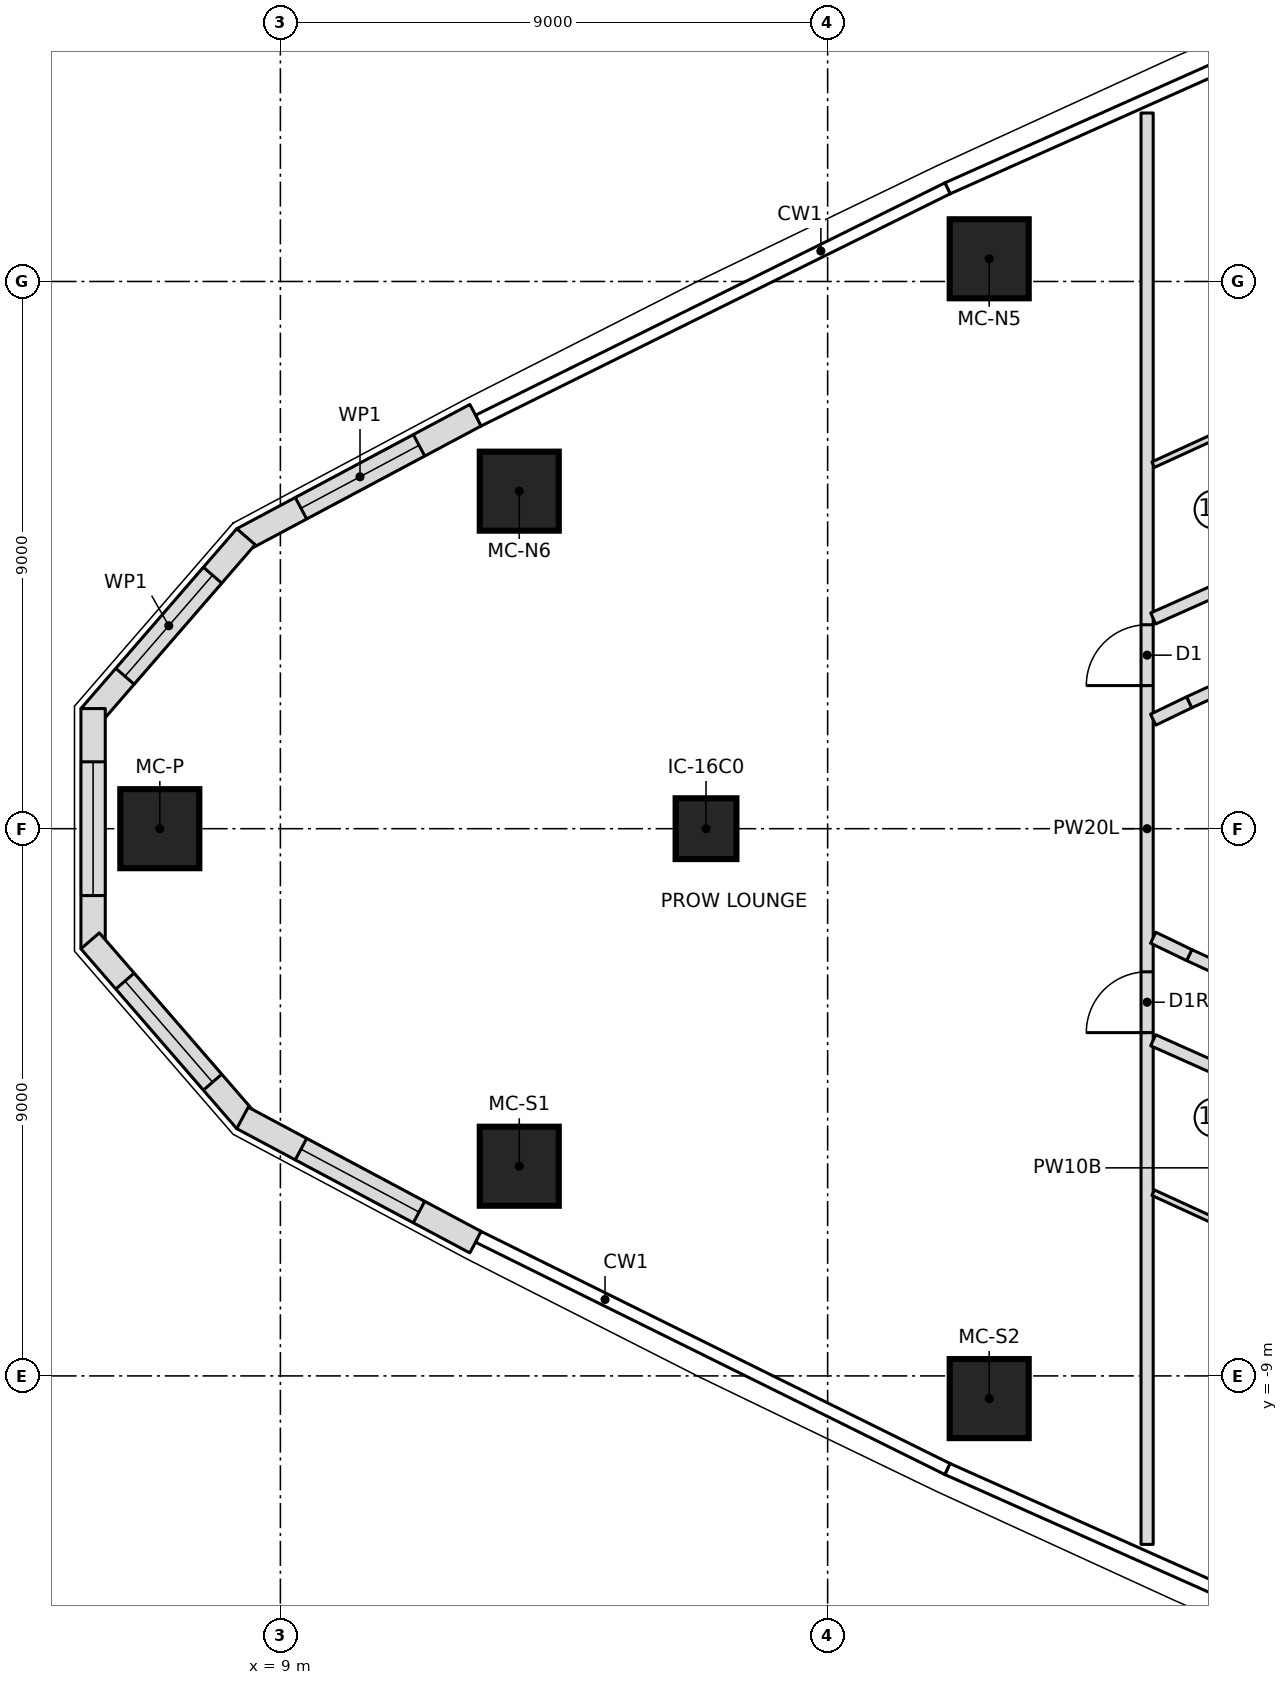
"""IFC4 building model, lengths in metres.
Left out: names, types, materials, properties, quantities, classifications, styles, units other than length and angle.
Written with IfcOpenShell. Run it as: python <this file> out.ifc"""

import sys

from ifc_helpers import new_model, si_unit, direction, frame, frame_2d, origin, origin_2d, place, context, subcontext, project, spatial, polyline, rectangle, outline, extrude, element, fill, save


model = new_model("IFC4")
c1 = context("Model", 3, precision=1e-05, world=origin(), true_north=direction((0.0, 1.0)))
c2 = subcontext(c1, "Body", "Model", "MODEL_VIEW")
j1 = project(units=[si_unit("LENGTHUNIT", "METRE"), si_unit("PLANEANGLEUNIT", "RADIAN")], contexts=[c1])
p1 = place(None, origin())
s1 = spatial("IfcSite", under=j1, at=p1, CompositionType="ELEMENT")
p2 = place(p1, origin())
s2 = spatial("IfcBuilding", under=s1, at=p2, CompositionType="ELEMENT")
p3 = place(p2, frame((0.0, 0.0, 203.9)))
s3 = spatial("IfcBuildingStorey", under=s2, at=p3, CompositionType="ELEMENT", Elevation=203.9)
for number, where, z_axis, x_axis in (
    (1, (7.017, 0.0, 0.0), (0.0, 0.0, 1.0), (1.0, 0.0, 0.0)),
    (2, (12.929, -5.552, 0.0), (0.0, 0.0, 1.0), (1.0, 0.0, 0.0)),
    (3, (20.657, -9.373, 0.0), (0.0, 0.0, 1.0), (1.0, 0.0, 0.0)),
    (4, (20.657, 9.373, 0.0), (0.0, 0.0, 1.0), (1.0, 0.0, 0.0)),
    (5, (12.929, 5.552, 0.0), (0.0, 0.0, 1.0), (1.0, 0.0, 0.0)),
):
    element("IfcColumn", number, at=place(p3, frame(where, z_axis=z_axis, x_axis=x_axis)), inside=s3, PredefinedType="COLUMN", context=c2, shape_type="SweptSolid", body=[
        extrude(rectangle(XDim=1.3, YDim=1.3, at=origin_2d()), origin(), (0.0, 0.0, 1.0), 3.55),
    ])
p4 = place(p3, frame((16.0, 0.0, 0.0), z_axis=(0.0, 0.0, 1.0), x_axis=(1.0, 0.0, 0.0)))
e6 = element("IfcColumn", 6, at=p4, inside=s3, PredefinedType="COLUMN", context=c2, shape_type="SweptSolid", body=[
    extrude(rectangle(XDim=1.0, YDim=1.0, at=origin_2d()), origin(), (0.0, 0.0, 1.0), 3.55),
])
p5 = place(p3, frame((12.21, 6.801, 0.0), z_axis=(0.0, 0.0, 1.0), x_axis=(-0.882385889746, -0.470526451518, 0.0)))
e7 = element("IfcWall", 7, at=p5, inside=s3, PredefinedType="NOTDEFINED", context=c2, shape_type="SweptSolid", body=[
    extrude(outline(polyline([(0.0, -0.2), (4.344, -0.2), (4.27, 0.2), (0.0, 0.2), (0.0, -0.2)])), origin(), (0.0, 0.0, 1.0), 3.25),
])
p6 = place(p5, frame((1.053, 0.0, 0.6)))
e8 = element("IfcOpeningElement", 8, at=p6, cuts=e7, PredefinedType="OPENING", context=c2, shape_type="SweptSolid", body=[
    extrude(outline(polyline([(0.0, 1.35), (0.084, 1.771), (0.322, 2.128), (0.679, 2.366), (1.1, 2.45), (1.521, 2.366), (1.878, 2.128), (2.116, 1.771), (2.2, 1.35), (2.2, 1.1), (2.116, 0.679), (1.878, 0.322), (1.521, 0.084), (1.1, 0.0), (0.679, 0.084), (0.322, 0.322), (0.084, 0.679), (0.0, 1.1), (0.0, 1.35)])), frame((0.0, 0.21, 0.0), z_axis=(0.0, -1.0, 0.0), x_axis=(1.0, 0.0, 0.0)), (0.0, 0.0, 1.0), 0.42),
])
p7 = place(p3, frame((8.409, 4.774, 0.0), z_axis=(0.0, 0.0, 1.0), x_axis=(-0.654759384203, -0.755837382509, 0.0)))
e9 = element("IfcWall", 9, at=p7, inside=s3, PredefinedType="NOTDEFINED", context=c2, shape_type="SweptSolid", body=[
    extrude(outline(polyline([(-0.037, -0.2), (3.876, -0.2), (3.727, 0.2), (0.037, 0.2), (-0.037, -0.2)])), origin(), (0.0, 0.0, 1.0), 3.25),
])
p8 = place(p7, frame((0.801, 0.0, 0.6)))
e10 = element("IfcOpeningElement", 10, at=p8, cuts=e9, PredefinedType="OPENING", context=c2, shape_type="SweptSolid", body=[
    extrude(outline(polyline([(0.0, 1.35), (0.084, 1.771), (0.322, 2.128), (0.679, 2.366), (1.1, 2.45), (1.521, 2.366), (1.878, 2.128), (2.116, 1.771), (2.2, 1.35), (2.2, 1.1), (2.116, 0.679), (1.878, 0.322), (1.521, 0.084), (1.1, 0.0), (0.679, 0.084), (0.322, 0.322), (0.084, 0.679), (0.0, 1.1), (0.0, 1.35)])), frame((0.0, 0.21, 0.0), z_axis=(0.0, -1.0, 0.0), x_axis=(1.0, 0.0, 0.0)), (0.0, 0.0, 1.0), 0.42),
])
p9 = place(p3, frame((5.92, 1.901, 0.0), z_axis=(0.0, 0.0, 1.0), x_axis=(0.0, -1.0, 0.0)))
e11 = element("IfcWall", 11, at=p9, inside=s3, PredefinedType="NOTDEFINED", context=c2, shape_type="SweptSolid", body=[
    extrude(outline(polyline([(-0.075, -0.2), (3.876, -0.2), (3.727, 0.2), (0.075, 0.2), (-0.075, -0.2)])), origin(), (0.0, 0.0, 1.0), 3.25),
])
p10 = place(p9, frame((0.801, 0.0, 0.6)))
e12 = element("IfcOpeningElement", 12, at=p10, cuts=e11, PredefinedType="OPENING", context=c2, shape_type="SweptSolid", body=[
    extrude(outline(polyline([(0.0, 1.35), (0.084, 1.771), (0.322, 2.128), (0.679, 2.366), (1.1, 2.45), (1.521, 2.366), (1.878, 2.128), (2.116, 1.771), (2.2, 1.35), (2.2, 1.1), (2.116, 0.679), (1.878, 0.322), (1.521, 0.084), (1.1, 0.0), (0.679, 0.084), (0.322, 0.322), (0.084, 0.679), (0.0, 1.1), (0.0, 1.35)])), frame((0.0, 0.21, 0.0), z_axis=(0.0, -1.0, 0.0), x_axis=(1.0, 0.0, 0.0)), (0.0, 0.0, 1.0), 0.42),
])
p11 = place(p3, frame((5.92, -1.901, 0.0), z_axis=(0.0, 0.0, 1.0), x_axis=(0.654759384203, -0.755837382509, 0.0)))
e13 = element("IfcWall", 13, at=p11, inside=s3, PredefinedType="NOTDEFINED", context=c2, shape_type="SweptSolid", body=[
    extrude(outline(polyline([(-0.075, -0.2), (3.839, -0.2), (3.765, 0.2), (0.075, 0.2), (-0.075, -0.2)])), origin(), (0.0, 0.0, 1.0), 3.25),
])
p12 = place(p11, frame((0.801, 0.0, 0.6)))
e14 = element("IfcOpeningElement", 14, at=p12, cuts=e13, PredefinedType="OPENING", context=c2, shape_type="SweptSolid", body=[
    extrude(outline(polyline([(0.0, 1.35), (0.084, 1.771), (0.322, 2.128), (0.679, 2.366), (1.1, 2.45), (1.521, 2.366), (1.878, 2.128), (2.116, 1.771), (2.2, 1.35), (2.2, 1.1), (2.116, 0.679), (1.878, 0.322), (1.521, 0.084), (1.1, 0.0), (0.679, 0.084), (0.322, 0.322), (0.084, 0.679), (0.0, 1.1), (0.0, 1.35)])), frame((0.0, 0.21, 0.0), z_axis=(0.0, -1.0, 0.0), x_axis=(1.0, 0.0, 0.0)), (0.0, 0.0, 1.0), 0.42),
])
p13 = place(p3, frame((8.409, -4.774, 0.0), z_axis=(0.0, 0.0, 1.0), x_axis=(0.882385889746, -0.470526451518, 0.0)))
e15 = element("IfcWall", 15, at=p13, inside=s3, PredefinedType="NOTDEFINED", context=c2, shape_type="SweptSolid", body=[
    extrude(outline(polyline([(-0.037, -0.2), (4.307, -0.2), (4.307, 0.2), (0.037, 0.2), (-0.037, -0.2)])), origin(), (0.0, 0.0, 1.0), 3.25),
])
p14 = place(p13, frame((1.053, 0.0, 0.6)))
e16 = element("IfcOpeningElement", 16, at=p14, cuts=e15, PredefinedType="OPENING", context=c2, shape_type="SweptSolid", body=[
    extrude(outline(polyline([(0.0, 1.35), (0.084, 1.771), (0.322, 2.128), (0.679, 2.366), (1.1, 2.45), (1.521, 2.366), (1.878, 2.128), (2.116, 1.771), (2.2, 1.35), (2.2, 1.1), (2.116, 0.679), (1.878, 0.322), (1.521, 0.084), (1.1, 0.0), (0.679, 0.084), (0.322, 0.322), (0.084, 0.679), (0.0, 1.1), (0.0, 1.35)])), frame((0.0, 0.21, 0.0), z_axis=(0.0, -1.0, 0.0), x_axis=(1.0, 0.0, 0.0)), (0.0, 0.0, 1.0), 0.42),
])
p15 = place(p3, frame((23.254, -11.771, 0.0), z_axis=(0.0, 0.0, 1.0), x_axis=(0.0, 1.0, 0.0)))
e17 = element("IfcWall", 17, at=p15, inside=s3, PredefinedType="PARTITIONING", context=c2, shape_type="SweptSolid", body=[
    extrude(rectangle(XDim=23.542, YDim=0.2, at=frame_2d((11.771, 0.0))), origin(), (0.0, 0.0, 1.0), 3.25),
])
p16 = place(p15, frame((14.125, 0.0, 0.0)))
e18 = element("IfcOpeningElement", 18, at=p16, cuts=e17, PredefinedType="OPENING", context=c2, shape_type="SweptSolid", body=[
    extrude(rectangle(XDim=1.0, YDim=2.1, at=frame_2d((0.5, 1.05))), frame((0.0, 0.11, 0.0), z_axis=(0.0, -1.0, 0.0), x_axis=(1.0, 0.0, 0.0)), (0.0, 0.0, 1.0), 0.22),
])
p17 = place(p15, frame((8.417, 0.0, 0.0)))
e19 = element("IfcOpeningElement", 19, at=p17, cuts=e17, PredefinedType="OPENING", context=c2, shape_type="SweptSolid", body=[
    extrude(rectangle(XDim=1.0, YDim=2.1, at=frame_2d((0.5, 1.05))), frame((0.0, 0.11, 0.0), z_axis=(0.0, -1.0, 0.0), x_axis=(1.0, 0.0, 0.0)), (0.0, 0.0, 1.0), 0.22),
])
p18 = place(p3, frame((23.354, 3.458, 0.0), z_axis=(0.0, 0.0, 1.0), x_axis=(0.913485016927, 0.406872368009, 0.0)))
e20 = element("IfcWall", 20, at=p18, inside=s3, PredefinedType="PARTITIONING", context=c2, shape_type="SweptSolid", body=[
    extrude(rectangle(XDim=8.332, YDim=0.2, at=frame_2d((4.166, 0.0))), origin(), (0.0, 0.0, 1.0), 3.25),
])
p19 = place(p18, frame((3.05, 0.0, 0.0)))
e21 = element("IfcOpeningElement", 21, at=p19, cuts=e20, PredefinedType="OPENING", context=c2, shape_type="SweptSolid", body=[
    extrude(rectangle(XDim=1.0, YDim=2.1, at=frame_2d((0.5, 1.05))), frame((0.0, 0.11, 0.0), z_axis=(0.0, -1.0, 0.0), x_axis=(1.0, 0.0, 0.0)), (0.0, 0.0, 1.0), 0.22),
])
p20 = place(p3, frame((23.354, 5.987, 0.0), z_axis=(0.0, 0.0, 1.0), x_axis=(0.909158902999, 0.416449383597, 0.0)))
e22 = element("IfcWall", 22, at=p20, inside=s3, PredefinedType="PARTITIONING", context=c2, shape_type="SweptSolid", body=[
    extrude(rectangle(XDim=1.556, YDim=0.1, at=frame_2d((0.778, 0.0))), origin(), (0.0, 0.0, 1.0), 3.25),
])
p21 = place(p3, frame((23.354, -3.479, 0.0), z_axis=(0.0, 0.0, 1.0), x_axis=(0.913491969365, -0.406856758461, 0.0)))
e23 = element("IfcWall", 23, at=p21, inside=s3, PredefinedType="PARTITIONING", context=c2, shape_type="SweptSolid", body=[
    extrude(rectangle(XDim=8.324, YDim=0.2, at=frame_2d((4.162, 0.0))), origin(), (0.0, 0.0, 1.0), 3.25),
])
p22 = place(p21, frame((3.05, 0.0, 0.0)))
e24 = element("IfcOpeningElement", 24, at=p22, cuts=e23, PredefinedType="OPENING", context=c2, shape_type="SweptSolid", body=[
    extrude(rectangle(XDim=1.0, YDim=2.1, at=frame_2d((0.5, 1.05))), frame((0.0, 0.11, 0.0), z_axis=(0.0, -1.0, 0.0), x_axis=(1.0, 0.0, 0.0)), (0.0, 0.0, 1.0), 0.22),
])
p23 = place(p3, frame((24.769, -6.635, 0.0), z_axis=(0.0, 0.0, 1.0), x_axis=(-0.909158902999, 0.416449383597, 0.0)))
e25 = element("IfcWall", 25, at=p23, inside=s3, PredefinedType="PARTITIONING", context=c2, shape_type="SweptSolid", body=[
    extrude(rectangle(XDim=1.556, YDim=0.1, at=frame_2d((0.778, 0.0))), origin(), (0.0, 0.0, 1.0), 3.25),
])
p24 = place(p3, frame((27.69, -3.793, 0.0), z_axis=(0.0, 0.0, 1.0), x_axis=(-0.909180834404, 0.416401501382, 0.0)))
e26 = element("IfcWall", 26, at=p24, inside=s3, PredefinedType="PARTITIONING", context=c2, shape_type="SweptSolid", body=[
    extrude(rectangle(XDim=4.117, YDim=0.2, at=frame_2d((2.059, 0.0))), origin(), (0.0, 0.0, 1.0), 3.25),
])
p25 = place(p24, frame((1.559, 0.0, 0.0)))
e27 = element("IfcOpeningElement", 27, at=p25, cuts=e26, PredefinedType="OPENING", context=c2, shape_type="SweptSolid", body=[
    extrude(rectangle(XDim=1.0, YDim=2.1, at=frame_2d((0.5, 1.05))), frame((0.0, 0.11, 0.0), z_axis=(0.0, -1.0, 0.0), x_axis=(1.0, 0.0, 0.0)), (0.0, 0.0, 1.0), 0.22),
])
for number, where, z_axis, x_axis in (
    (28, (23.947, -2.079, 0.0), (0.0, 0.0, 1.0), (-0.901, 0.435, 0.0)),
    (29, (23.354, 1.793, 0.0), (0.0, 0.0, 1.0), (0.901, 0.435, 0.0)),
):
    element("IfcWall", number, at=place(p3, frame(where, z_axis=z_axis, x_axis=x_axis)), inside=s3, PredefinedType="PARTITIONING", context=c2, shape_type="SweptSolid", body=[
        extrude(rectangle(XDim=0.658, YDim=0.2, at=frame_2d((0.329, 0.0))), origin(), (0.0, 0.0, 1.0), 3.25),
    ])
p26 = place(p3, frame((23.947, 2.079, 0.0), z_axis=(0.0, 0.0, 1.0), x_axis=(0.909180834404, 0.416401501382, 0.0)))
e30 = element("IfcWall", 30, at=p26, inside=s3, PredefinedType="PARTITIONING", context=c2, shape_type="SweptSolid", body=[
    extrude(rectangle(XDim=4.117, YDim=0.2, at=frame_2d((2.059, 0.0))), origin(), (0.0, 0.0, 1.0), 3.25),
])
p27 = place(p6, origin())
e31 = element("IfcWindow", 31, at=p27, inside=s3, PartitioningType="SINGLE_PANEL", PredefinedType="WINDOW", context=c2, shape_type="SweptSolid", body=[
    extrude(outline(polyline([(0.0, 1.35), (0.084, 1.771), (0.322, 2.128), (0.679, 2.366), (1.1, 2.45), (1.521, 2.366), (1.878, 2.128), (2.116, 1.771), (2.2, 1.35), (2.2, 1.1), (2.116, 0.679), (1.878, 0.322), (1.521, 0.084), (1.1, 0.0), (0.679, 0.084), (0.322, 0.322), (0.084, 0.679), (0.0, 1.1), (0.0, 1.35)])), frame((0.0, 0.17, 0.0), z_axis=(0.0, -1.0, 0.0), x_axis=(1.0, 0.0, 0.0)), (0.0, 0.0, 1.0), 0.06),
])
fill(e8, e31)
p28 = place(p8, origin())
e32 = element("IfcWindow", 32, at=p28, inside=s3, PartitioningType="SINGLE_PANEL", PredefinedType="WINDOW", context=c2, shape_type="SweptSolid", body=[
    extrude(outline(polyline([(0.0, 1.35), (0.084, 1.771), (0.322, 2.128), (0.679, 2.366), (1.1, 2.45), (1.521, 2.366), (1.878, 2.128), (2.116, 1.771), (2.2, 1.35), (2.2, 1.1), (2.116, 0.679), (1.878, 0.322), (1.521, 0.084), (1.1, 0.0), (0.679, 0.084), (0.322, 0.322), (0.084, 0.679), (0.0, 1.1), (0.0, 1.35)])), frame((0.0, 0.17, 0.0), z_axis=(0.0, -1.0, 0.0), x_axis=(1.0, 0.0, 0.0)), (0.0, 0.0, 1.0), 0.06),
])
fill(e10, e32)
p29 = place(p10, origin())
e33 = element("IfcWindow", 33, at=p29, inside=s3, PartitioningType="SINGLE_PANEL", PredefinedType="WINDOW", context=c2, shape_type="SweptSolid", body=[
    extrude(outline(polyline([(0.0, 1.35), (0.084, 1.771), (0.322, 2.128), (0.679, 2.366), (1.1, 2.45), (1.521, 2.366), (1.878, 2.128), (2.116, 1.771), (2.2, 1.35), (2.2, 1.1), (2.116, 0.679), (1.878, 0.322), (1.521, 0.084), (1.1, 0.0), (0.679, 0.084), (0.322, 0.322), (0.084, 0.679), (0.0, 1.1), (0.0, 1.35)])), frame((0.0, 0.17, 0.0), z_axis=(0.0, -1.0, 0.0), x_axis=(1.0, 0.0, 0.0)), (0.0, 0.0, 1.0), 0.06),
])
fill(e12, e33)
p30 = place(p12, origin())
e34 = element("IfcWindow", 34, at=p30, inside=s3, PartitioningType="SINGLE_PANEL", PredefinedType="WINDOW", context=c2, shape_type="SweptSolid", body=[
    extrude(outline(polyline([(0.0, 1.35), (0.084, 1.771), (0.322, 2.128), (0.679, 2.366), (1.1, 2.45), (1.521, 2.366), (1.878, 2.128), (2.116, 1.771), (2.2, 1.35), (2.2, 1.1), (2.116, 0.679), (1.878, 0.322), (1.521, 0.084), (1.1, 0.0), (0.679, 0.084), (0.322, 0.322), (0.084, 0.679), (0.0, 1.1), (0.0, 1.35)])), frame((0.0, 0.17, 0.0), z_axis=(0.0, -1.0, 0.0), x_axis=(1.0, 0.0, 0.0)), (0.0, 0.0, 1.0), 0.06),
])
fill(e14, e34)
p31 = place(p14, origin())
e35 = element("IfcWindow", 35, at=p31, inside=s3, PartitioningType="SINGLE_PANEL", PredefinedType="WINDOW", context=c2, shape_type="SweptSolid", body=[
    extrude(outline(polyline([(0.0, 1.35), (0.084, 1.771), (0.322, 2.128), (0.679, 2.366), (1.1, 2.45), (1.521, 2.366), (1.878, 2.128), (2.116, 1.771), (2.2, 1.35), (2.2, 1.1), (2.116, 0.679), (1.878, 0.322), (1.521, 0.084), (1.1, 0.0), (0.679, 0.084), (0.322, 0.322), (0.084, 0.679), (0.0, 1.1), (0.0, 1.35)])), frame((0.0, 0.17, 0.0), z_axis=(0.0, -1.0, 0.0), x_axis=(1.0, 0.0, 0.0)), (0.0, 0.0, 1.0), 0.06),
])
fill(e16, e35)
p32 = place(p16, origin())
e36 = element("IfcDoor", 36, at=p32, inside=s3, OperationType="SINGLE_SWING_LEFT", PredefinedType="DOOR", context=c2, shape_type="SweptSolid", body=[
    extrude(rectangle(XDim=1.0, YDim=2.1, at=frame_2d((0.5, 1.05))), frame((0.0, 0.025, 0.0), z_axis=(0.0, -1.0, 0.0), x_axis=(1.0, 0.0, 0.0)), (0.0, 0.0, 1.0), 0.05),
])
fill(e18, e36)
p33 = place(p17, origin())
e37 = element("IfcDoor", 37, at=p33, inside=s3, OperationType="SINGLE_SWING_RIGHT", PredefinedType="DOOR", context=c2, shape_type="SweptSolid", body=[
    extrude(rectangle(XDim=1.0, YDim=2.1, at=frame_2d((0.5, 1.05))), frame((0.0, 0.025, 0.0), z_axis=(0.0, -1.0, 0.0), x_axis=(1.0, 0.0, 0.0)), (0.0, 0.0, 1.0), 0.05),
])
fill(e19, e37)
save(model, sys.argv[1])
